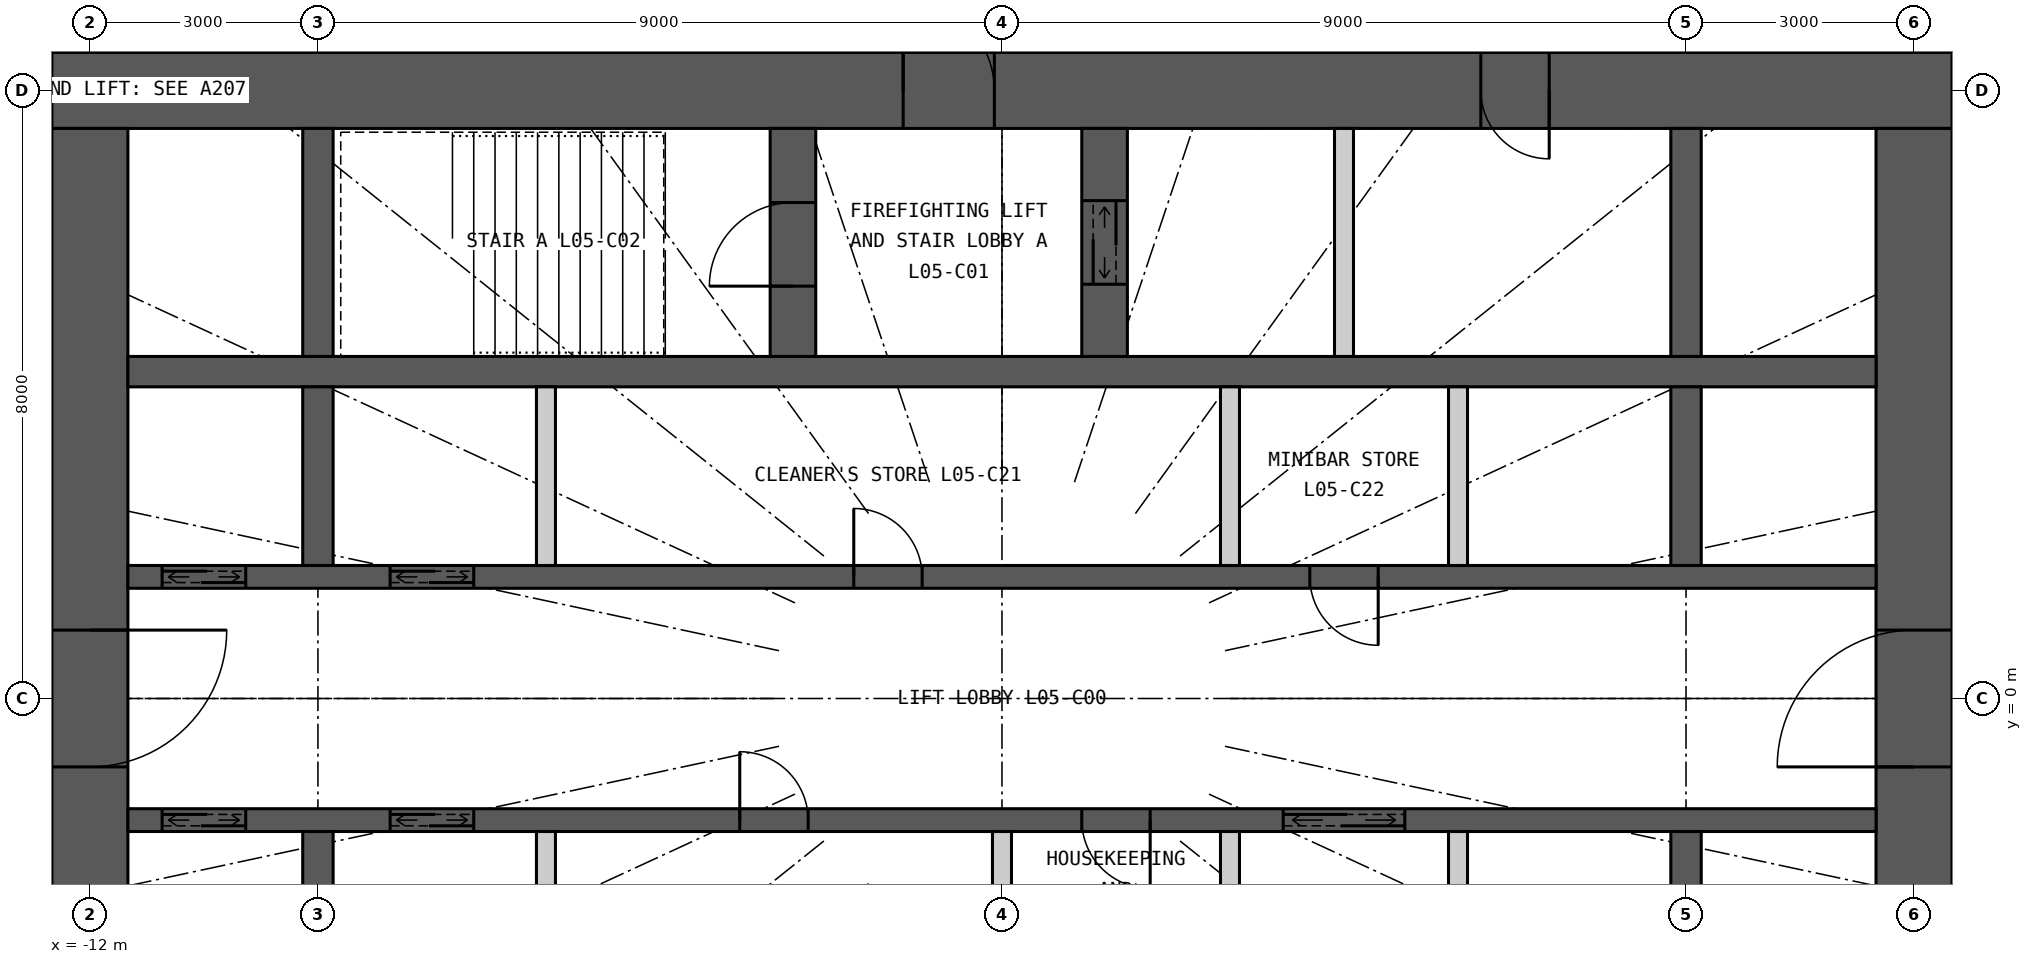
"""IFC4 building model, lengths in metres.
Left out: names, types, materials, properties, quantities, classifications, styles, units other than length and angle.
Written with IfcOpenShell. Run it as: python <this file> out.ifc"""

import sys

from ifc_helpers import new_model, si_unit, direction, frame, frame_2d, origin, place, context, subcontext, project, spatial, rectangle, extrude, element, fill, save


model = new_model("IFC4")
c1 = context("Model", 3, precision=1e-05, world=origin(), true_north=direction((0.0, 1.0)))
c2 = subcontext(c1, "Body", "Model", "MODEL_VIEW")
j1 = project(units=[si_unit("LENGTHUNIT", "METRE"), si_unit("PLANEANGLEUNIT", "RADIAN")], contexts=[c1])
p1 = place(None, origin())
s1 = spatial("IfcSite", under=j1, at=p1, CompositionType="ELEMENT")
p2 = place(p1, origin())
s2 = spatial("IfcBuilding", under=s1, at=p2, CompositionType="ELEMENT")
p3 = place(p2, frame((0.0, 0.0, 29.4)))
s3 = spatial("IfcBuildingStorey", under=s2, at=p3, CompositionType="ELEMENT", Elevation=29.4)
p4 = place(p3, frame((-12.5, 8.0, 0.0), z_axis=(0.0, 0.0, 1.0), x_axis=(1.0, 0.0, 0.0)))
e1 = element("IfcWall", 1, at=p4, inside=s3, PredefinedType="SHEAR", context=c2, shape_type="SweptSolid", body=[
    extrude(rectangle(XDim=25.0, YDim=1.0, at=frame_2d((12.5, 0.0))), origin(), (0.0, 0.0, 1.0), 3.3),
])
p5 = place(p4, frame((11.2, 0.0, 0.0)))
e2 = element("IfcOpeningElement", 2, at=p5, cuts=e1, PredefinedType="OPENING", context=c2, shape_type="SweptSolid", body=[
    extrude(rectangle(XDim=1.2, YDim=2.2, at=frame_2d((0.6, 1.1))), frame((0.0, 0.51, 0.0), z_axis=(0.0, -1.0, 0.0), x_axis=(1.0, 0.0, 0.0)), (0.0, 0.0, 1.0), 1.02),
])
p6 = place(p4, frame((18.8, 0.0, 0.0)))
e3 = element("IfcOpeningElement", 3, at=p6, cuts=e1, PredefinedType="OPENING", context=c2, shape_type="SweptSolid", body=[
    extrude(rectangle(XDim=0.9, YDim=2.2, at=frame_2d((0.45, 1.1))), frame((0.0, 0.51, 0.0), z_axis=(0.0, -1.0, 0.0), x_axis=(1.0, 0.0, 0.0)), (0.0, 0.0, 1.0), 1.02),
])
p7 = place(p3, frame((12.0, -7.5, 0.0), z_axis=(0.0, 0.0, 1.0), x_axis=(0.0, 1.0, 0.0)))
e4 = element("IfcWall", 4, at=p7, inside=s3, PredefinedType="SHEAR", context=c2, shape_type="SweptSolid", body=[
    extrude(rectangle(XDim=15.0, YDim=1.0, at=frame_2d((7.5, 0.0))), origin(), (0.0, 0.0, 1.0), 3.3),
])
p8 = place(p7, frame((6.6, 0.0, 0.0)))
e5 = element("IfcOpeningElement", 5, at=p8, cuts=e4, PredefinedType="OPENING", context=c2, shape_type="SweptSolid", body=[
    extrude(rectangle(XDim=1.8, YDim=2.2, at=frame_2d((0.9, 1.1))), frame((0.0, 0.51, 0.0), z_axis=(0.0, -1.0, 0.0), x_axis=(1.0, 0.0, 0.0)), (0.0, 0.0, 1.0), 1.02),
])
p9 = place(p3, frame((-12.0, 7.5, 0.0), z_axis=(0.0, 0.0, 1.0), x_axis=(0.0, -1.0, 0.0)))
e6 = element("IfcWall", 6, at=p9, inside=s3, PredefinedType="SHEAR", context=c2, shape_type="SweptSolid", body=[
    extrude(rectangle(XDim=15.0, YDim=1.0, at=frame_2d((7.5, 0.0))), origin(), (0.0, 0.0, 1.0), 3.3),
])
p10 = place(p9, frame((6.6, 0.0, 0.0)))
e7 = element("IfcOpeningElement", 7, at=p10, cuts=e6, PredefinedType="OPENING", context=c2, shape_type="SweptSolid", body=[
    extrude(rectangle(XDim=1.8, YDim=2.2, at=frame_2d((0.9, 1.1))), frame((0.0, 0.51, 0.0), z_axis=(0.0, -1.0, 0.0), x_axis=(1.0, 0.0, 0.0)), (0.0, 0.0, 1.0), 1.02),
])
p11 = place(p3, frame((-11.5, 4.3, 0.0), z_axis=(0.0, 0.0, 1.0), x_axis=(1.0, 0.0, 0.0)))
e8 = element("IfcWall", 8, at=p11, inside=s3, PredefinedType="SHEAR", context=c2, shape_type="SweptSolid", body=[
    extrude(rectangle(XDim=23.0, YDim=0.4, at=frame_2d((11.5, 0.0))), origin(), (0.0, 0.0, 1.0), 3.3),
])
p12 = place(p3, frame((-11.5, 1.6, 0.0), z_axis=(0.0, 0.0, 1.0), x_axis=(1.0, 0.0, 0.0)))
e9 = element("IfcWall", 9, at=p12, inside=s3, PredefinedType="SHEAR", context=c2, shape_type="SweptSolid", body=[
    extrude(rectangle(XDim=23.0, YDim=0.3, at=frame_2d((11.5, 0.0))), origin(), (0.0, 0.0, 1.0), 3.3),
])
p13 = place(p12, frame((0.45, 0.0, 0.0)))
e10 = element("IfcOpeningElement", 10, at=p13, cuts=e9, PredefinedType="OPENING", context=c2, shape_type="SweptSolid", body=[
    extrude(rectangle(XDim=1.1, YDim=2.2, at=frame_2d((0.55, 1.1))), frame((0.0, 0.16, 0.0), z_axis=(0.0, -1.0, 0.0), x_axis=(1.0, 0.0, 0.0)), (0.0, 0.0, 1.0), 0.32),
])
p14 = place(p12, frame((3.45, 0.0, 0.0)))
e11 = element("IfcOpeningElement", 11, at=p14, cuts=e9, PredefinedType="OPENING", context=c2, shape_type="SweptSolid", body=[
    extrude(rectangle(XDim=1.1, YDim=2.2, at=frame_2d((0.55, 1.1))), frame((0.0, 0.16, 0.0), z_axis=(0.0, -1.0, 0.0), x_axis=(1.0, 0.0, 0.0)), (0.0, 0.0, 1.0), 0.32),
])
p15 = place(p12, frame((9.55, 0.0, 0.0)))
e12 = element("IfcOpeningElement", 12, at=p15, cuts=e9, PredefinedType="OPENING", context=c2, shape_type="SweptSolid", body=[
    extrude(rectangle(XDim=0.9, YDim=2.2, at=frame_2d((0.45, 1.1))), frame((0.0, 0.16, 0.0), z_axis=(0.0, -1.0, 0.0), x_axis=(1.0, 0.0, 0.0)), (0.0, 0.0, 1.0), 0.32),
])
p16 = place(p12, frame((15.55, 0.0, 0.0)))
e13 = element("IfcOpeningElement", 13, at=p16, cuts=e9, PredefinedType="OPENING", context=c2, shape_type="SweptSolid", body=[
    extrude(rectangle(XDim=0.9, YDim=2.2, at=frame_2d((0.45, 1.1))), frame((0.0, 0.16, 0.0), z_axis=(0.0, -1.0, 0.0), x_axis=(1.0, 0.0, 0.0)), (0.0, 0.0, 1.0), 0.32),
])
p17 = place(p3, frame((-11.5, -1.6, 0.0), z_axis=(0.0, 0.0, 1.0), x_axis=(1.0, 0.0, 0.0)))
e14 = element("IfcWall", 14, at=p17, inside=s3, PredefinedType="SHEAR", context=c2, shape_type="SweptSolid", body=[
    extrude(rectangle(XDim=23.0, YDim=0.3, at=frame_2d((11.5, 0.0))), origin(), (0.0, 0.0, 1.0), 3.3),
])
p18 = place(p17, frame((0.45, 0.0, 0.0)))
e15 = element("IfcOpeningElement", 15, at=p18, cuts=e14, PredefinedType="OPENING", context=c2, shape_type="SweptSolid", body=[
    extrude(rectangle(XDim=1.1, YDim=2.2, at=frame_2d((0.55, 1.1))), frame((0.0, 0.16, 0.0), z_axis=(0.0, -1.0, 0.0), x_axis=(1.0, 0.0, 0.0)), (0.0, 0.0, 1.0), 0.32),
])
p19 = place(p17, frame((3.45, 0.0, 0.0)))
e16 = element("IfcOpeningElement", 16, at=p19, cuts=e14, PredefinedType="OPENING", context=c2, shape_type="SweptSolid", body=[
    extrude(rectangle(XDim=1.1, YDim=2.2, at=frame_2d((0.55, 1.1))), frame((0.0, 0.16, 0.0), z_axis=(0.0, -1.0, 0.0), x_axis=(1.0, 0.0, 0.0)), (0.0, 0.0, 1.0), 0.32),
])
p20 = place(p17, frame((15.2, 0.0, 0.0)))
e17 = element("IfcOpeningElement", 17, at=p20, cuts=e14, PredefinedType="OPENING", context=c2, shape_type="SweptSolid", body=[
    extrude(rectangle(XDim=1.6, YDim=2.4, at=frame_2d((0.8, 1.2))), frame((0.0, 0.16, 0.0), z_axis=(0.0, -1.0, 0.0), x_axis=(1.0, 0.0, 0.0)), (0.0, 0.0, 1.0), 0.32),
])
p21 = place(p17, frame((8.05, 0.0, 0.0)))
e18 = element("IfcOpeningElement", 18, at=p21, cuts=e14, PredefinedType="OPENING", context=c2, shape_type="SweptSolid", body=[
    extrude(rectangle(XDim=0.9, YDim=2.2, at=frame_2d((0.45, 1.1))), frame((0.0, 0.16, 0.0), z_axis=(0.0, -1.0, 0.0), x_axis=(1.0, 0.0, 0.0)), (0.0, 0.0, 1.0), 0.32),
])
p22 = place(p17, frame((12.55, 0.0, 0.0)))
e19 = element("IfcOpeningElement", 19, at=p22, cuts=e14, PredefinedType="OPENING", context=c2, shape_type="SweptSolid", body=[
    extrude(rectangle(XDim=0.9, YDim=2.2, at=frame_2d((0.45, 1.1))), frame((0.0, 0.16, 0.0), z_axis=(0.0, -1.0, 0.0), x_axis=(1.0, 0.0, 0.0)), (0.0, 0.0, 1.0), 0.32),
])
p23 = place(p3, frame((-9.0, 4.5, 0.0), z_axis=(0.0, 0.0, 1.0), x_axis=(0.0, 1.0, 0.0)))
e20 = element("IfcWall", 20, at=p23, inside=s3, PredefinedType="SHEAR", context=c2, shape_type="SweptSolid", body=[
    extrude(rectangle(XDim=3.0, YDim=0.4, at=frame_2d((1.5, 0.0))), origin(), (0.0, 0.0, 1.0), 3.3),
])
for number, where, z_axis, x_axis in (
    (21, (-9.0, 1.75, 0.0), (0.0, 0.0, 1.0), (0.0, 1.0, 0.0)),
    (22, (-9.0, -4.1, 0.0), (0.0, 0.0, 1.0), (0.0, 1.0, 0.0)),
):
    element("IfcWall", number, at=place(p3, frame(where, z_axis=z_axis, x_axis=x_axis)), inside=s3, PredefinedType="SHEAR", context=c2, shape_type="SweptSolid", body=[
        extrude(rectangle(XDim=2.35, YDim=0.4, at=frame_2d((1.175, 0.0))), origin(), (0.0, 0.0, 1.0), 3.3),
    ])
p24 = place(p3, frame((9.0, 4.5, 0.0), z_axis=(0.0, 0.0, 1.0), x_axis=(0.0, 1.0, 0.0)))
e23 = element("IfcWall", 23, at=p24, inside=s3, PredefinedType="SHEAR", context=c2, shape_type="SweptSolid", body=[
    extrude(rectangle(XDim=3.0, YDim=0.4, at=frame_2d((1.5, 0.0))), origin(), (0.0, 0.0, 1.0), 3.3),
])
for number, where, z_axis, x_axis in (
    (24, (9.0, 1.75, 0.0), (0.0, 0.0, 1.0), (0.0, 1.0, 0.0)),
    (25, (9.0, -4.1, 0.0), (0.0, 0.0, 1.0), (0.0, 1.0, 0.0)),
):
    element("IfcWall", number, at=place(p3, frame(where, z_axis=z_axis, x_axis=x_axis)), inside=s3, PredefinedType="SHEAR", context=c2, shape_type="SweptSolid", body=[
        extrude(rectangle(XDim=2.35, YDim=0.4, at=frame_2d((1.175, 0.0))), origin(), (0.0, 0.0, 1.0), 3.3),
    ])
p25 = place(p3, frame((-2.75, 4.5, 0.0), z_axis=(0.0, 0.0, 1.0), x_axis=(0.0, 1.0, 0.0)))
e26 = element("IfcWall", 26, at=p25, inside=s3, PredefinedType="SHEAR", context=c2, shape_type="SweptSolid", body=[
    extrude(rectangle(XDim=3.0, YDim=0.6, at=frame_2d((1.5, 0.0))), origin(), (0.0, 0.0, 1.0), 3.3),
])
p26 = place(p25, frame((0.925, 0.0, 0.0)))
e27 = element("IfcOpeningElement", 27, at=p26, cuts=e26, PredefinedType="OPENING", context=c2, shape_type="SweptSolid", body=[
    extrude(rectangle(XDim=1.1, YDim=2.2, at=frame_2d((0.55, 1.1))), frame((0.0, 0.31, 0.0), z_axis=(0.0, -1.0, 0.0), x_axis=(1.0, 0.0, 0.0)), (0.0, 0.0, 1.0), 0.62),
])
p27 = place(p3, frame((1.35, 4.5, 0.0), z_axis=(0.0, 0.0, 1.0), x_axis=(0.0, 1.0, 0.0)))
e28 = element("IfcWall", 28, at=p27, inside=s3, PredefinedType="SHEAR", context=c2, shape_type="SweptSolid", body=[
    extrude(rectangle(XDim=3.0, YDim=0.6, at=frame_2d((1.5, 0.0))), origin(), (0.0, 0.0, 1.0), 3.3),
])
p28 = place(p27, frame((0.95, 0.0, 0.0)))
e29 = element("IfcOpeningElement", 29, at=p28, cuts=e28, PredefinedType="OPENING", context=c2, shape_type="SweptSolid", body=[
    extrude(rectangle(XDim=1.1, YDim=2.2, at=frame_2d((0.55, 1.1))), frame((0.0, 0.31, 0.0), z_axis=(0.0, -1.0, 0.0), x_axis=(1.0, 0.0, 0.0)), (0.0, 0.0, 1.0), 0.62),
])
p29 = place(p3, frame((4.5, 4.5, 0.0), z_axis=(0.0, 0.0, 1.0), x_axis=(0.0, 1.0, 0.0)))
e30 = element("IfcWall", 30, at=p29, inside=s3, PredefinedType="PARTITIONING", context=c2, shape_type="SweptSolid", body=[
    extrude(rectangle(XDim=3.0, YDim=0.25, at=frame_2d((1.5, 0.0))), origin(), (0.0, 0.0, 1.0), 3.3),
])
for number, where, z_axis, x_axis in (
    (31, (-6.0, 1.75, 0.0), (0.0, 0.0, 1.0), (0.0, 1.0, 0.0)),
    (32, (3.0, 1.75, 0.0), (0.0, 0.0, 1.0), (0.0, 1.0, 0.0)),
    (33, (6.0, 1.75, 0.0), (0.0, 0.0, 1.0), (0.0, 1.0, 0.0)),
    (34, (-6.0, -4.1, 0.0), (0.0, 0.0, 1.0), (0.0, 1.0, 0.0)),
    (35, (0.0, -4.1, 0.0), (0.0, 0.0, 1.0), (0.0, 1.0, 0.0)),
    (36, (3.0, -4.1, 0.0), (0.0, 0.0, 1.0), (0.0, 1.0, 0.0)),
    (37, (6.0, -4.1, 0.0), (0.0, 0.0, 1.0), (0.0, 1.0, 0.0)),
):
    element("IfcWall", number, at=place(p3, frame(where, z_axis=z_axis, x_axis=x_axis)), inside=s3, PredefinedType="PARTITIONING", context=c2, shape_type="SweptSolid", body=[
        extrude(rectangle(XDim=2.35, YDim=0.25, at=frame_2d((1.175, 0.0))), origin(), (0.0, 0.0, 1.0), 3.3),
    ])
p30 = place(p5, origin())
e38 = element("IfcDoor", 38, at=p30, inside=s3, OperationType="SINGLE_SWING_LEFT", PredefinedType="DOOR", context=c2, shape_type="SweptSolid", body=[
    extrude(rectangle(XDim=1.2, YDim=2.2, at=frame_2d((0.6, 1.1))), frame((0.0, 0.025, 0.0), z_axis=(0.0, -1.0, 0.0), x_axis=(1.0, 0.0, 0.0)), (0.0, 0.0, 1.0), 0.05),
])
fill(e2, e38)
p31 = place(p26, origin())
e39 = element("IfcDoor", 39, at=p31, inside=s3, OperationType="SINGLE_SWING_LEFT", PredefinedType="DOOR", context=c2, shape_type="SweptSolid", body=[
    extrude(rectangle(XDim=1.1, YDim=2.2, at=frame_2d((0.55, 1.1))), frame((0.0, 0.025, 0.0), z_axis=(0.0, -1.0, 0.0), x_axis=(1.0, 0.0, 0.0)), (0.0, 0.0, 1.0), 0.05),
])
fill(e27, e39)
p32 = place(p28, origin())
e40 = element("IfcDoor", 40, at=p32, inside=s3, OperationType="DOUBLE_DOOR_SLIDING", PredefinedType="DOOR", context=c2, shape_type="SweptSolid", body=[
    extrude(rectangle(XDim=1.1, YDim=2.2, at=frame_2d((0.55, 1.1))), frame((0.0, 0.025, 0.0), z_axis=(0.0, -1.0, 0.0), x_axis=(1.0, 0.0, 0.0)), (0.0, 0.0, 1.0), 0.05),
])
fill(e29, e40)
p33 = place(p6, origin())
e41 = element("IfcDoor", 41, at=p33, inside=s3, OperationType="SINGLE_SWING_RIGHT", PredefinedType="DOOR", context=c2, shape_type="SweptSolid", body=[
    extrude(rectangle(XDim=0.9, YDim=2.2, at=frame_2d((0.45, 1.1))), frame((0.0, 0.025, 0.0), z_axis=(0.0, -1.0, 0.0), x_axis=(1.0, 0.0, 0.0)), (0.0, 0.0, 1.0), 0.05),
])
fill(e3, e41)
p34 = place(p13, origin())
e42 = element("IfcDoor", 42, at=p34, inside=s3, OperationType="DOUBLE_DOOR_SLIDING", PredefinedType="DOOR", context=c2, shape_type="SweptSolid", body=[
    extrude(rectangle(XDim=1.1, YDim=2.2, at=frame_2d((0.55, 1.1))), frame((0.0, 0.025, 0.0), z_axis=(0.0, -1.0, 0.0), x_axis=(1.0, 0.0, 0.0)), (0.0, 0.0, 1.0), 0.05),
])
fill(e10, e42)
p35 = place(p14, origin())
e43 = element("IfcDoor", 43, at=p35, inside=s3, OperationType="DOUBLE_DOOR_SLIDING", PredefinedType="DOOR", context=c2, shape_type="SweptSolid", body=[
    extrude(rectangle(XDim=1.1, YDim=2.2, at=frame_2d((0.55, 1.1))), frame((0.0, 0.025, 0.0), z_axis=(0.0, -1.0, 0.0), x_axis=(1.0, 0.0, 0.0)), (0.0, 0.0, 1.0), 0.05),
])
fill(e11, e43)
p36 = place(p18, origin())
e44 = element("IfcDoor", 44, at=p36, inside=s3, OperationType="DOUBLE_DOOR_SLIDING", PredefinedType="DOOR", context=c2, shape_type="SweptSolid", body=[
    extrude(rectangle(XDim=1.1, YDim=2.2, at=frame_2d((0.55, 1.1))), frame((0.0, 0.025, 0.0), z_axis=(0.0, -1.0, 0.0), x_axis=(1.0, 0.0, 0.0)), (0.0, 0.0, 1.0), 0.05),
])
fill(e15, e44)
p37 = place(p19, origin())
e45 = element("IfcDoor", 45, at=p37, inside=s3, OperationType="DOUBLE_DOOR_SLIDING", PredefinedType="DOOR", context=c2, shape_type="SweptSolid", body=[
    extrude(rectangle(XDim=1.1, YDim=2.2, at=frame_2d((0.55, 1.1))), frame((0.0, 0.025, 0.0), z_axis=(0.0, -1.0, 0.0), x_axis=(1.0, 0.0, 0.0)), (0.0, 0.0, 1.0), 0.05),
])
fill(e16, e45)
p38 = place(p20, origin())
e46 = element("IfcDoor", 46, at=p38, inside=s3, OperationType="DOUBLE_DOOR_SLIDING", PredefinedType="DOOR", context=c2, shape_type="SweptSolid", body=[
    extrude(rectangle(XDim=1.6, YDim=2.4, at=frame_2d((0.8, 1.2))), frame((0.0, 0.025, 0.0), z_axis=(0.0, -1.0, 0.0), x_axis=(1.0, 0.0, 0.0)), (0.0, 0.0, 1.0), 0.05),
])
fill(e17, e46)
p39 = place(p15, origin())
e47 = element("IfcDoor", 47, at=p39, inside=s3, OperationType="SINGLE_SWING_LEFT", PredefinedType="DOOR", context=c2, shape_type="SweptSolid", body=[
    extrude(rectangle(XDim=0.9, YDim=2.2, at=frame_2d((0.45, 1.1))), frame((0.0, 0.025, 0.0), z_axis=(0.0, -1.0, 0.0), x_axis=(1.0, 0.0, 0.0)), (0.0, 0.0, 1.0), 0.05),
])
fill(e12, e47)
p40 = place(p16, origin())
e48 = element("IfcDoor", 48, at=p40, inside=s3, OperationType="SINGLE_SWING_RIGHT", PredefinedType="DOOR", context=c2, shape_type="SweptSolid", body=[
    extrude(rectangle(XDim=0.9, YDim=2.2, at=frame_2d((0.45, 1.1))), frame((0.0, 0.025, 0.0), z_axis=(0.0, -1.0, 0.0), x_axis=(1.0, 0.0, 0.0)), (0.0, 0.0, 1.0), 0.05),
])
fill(e13, e48)
p41 = place(p21, origin())
e49 = element("IfcDoor", 49, at=p41, inside=s3, OperationType="SINGLE_SWING_LEFT", PredefinedType="DOOR", context=c2, shape_type="SweptSolid", body=[
    extrude(rectangle(XDim=0.9, YDim=2.2, at=frame_2d((0.45, 1.1))), frame((0.0, 0.025, 0.0), z_axis=(0.0, -1.0, 0.0), x_axis=(1.0, 0.0, 0.0)), (0.0, 0.0, 1.0), 0.05),
])
fill(e18, e49)
p42 = place(p22, origin())
e50 = element("IfcDoor", 50, at=p42, inside=s3, OperationType="SINGLE_SWING_RIGHT", PredefinedType="DOOR", context=c2, shape_type="SweptSolid", body=[
    extrude(rectangle(XDim=0.9, YDim=2.2, at=frame_2d((0.45, 1.1))), frame((0.0, 0.025, 0.0), z_axis=(0.0, -1.0, 0.0), x_axis=(1.0, 0.0, 0.0)), (0.0, 0.0, 1.0), 0.05),
])
fill(e19, e50)
p43 = place(p8, origin())
e51 = element("IfcDoor", 51, at=p43, inside=s3, OperationType="DOUBLE_DOOR_DOUBLE_SWING", PredefinedType="DOOR", context=c2, shape_type="SweptSolid", body=[
    extrude(rectangle(XDim=1.8, YDim=2.2, at=frame_2d((0.9, 1.1))), frame((0.0, 0.025, 0.0), z_axis=(0.0, -1.0, 0.0), x_axis=(1.0, 0.0, 0.0)), (0.0, 0.0, 1.0), 0.05),
])
fill(e5, e51)
p44 = place(p10, origin())
e52 = element("IfcDoor", 52, at=p44, inside=s3, OperationType="DOUBLE_DOOR_DOUBLE_SWING", PredefinedType="DOOR", context=c2, shape_type="SweptSolid", body=[
    extrude(rectangle(XDim=1.8, YDim=2.2, at=frame_2d((0.9, 1.1))), frame((0.0, 0.025, 0.0), z_axis=(0.0, -1.0, 0.0), x_axis=(1.0, 0.0, 0.0)), (0.0, 0.0, 1.0), 0.05),
])
fill(e7, e52)
save(model, sys.argv[1])
